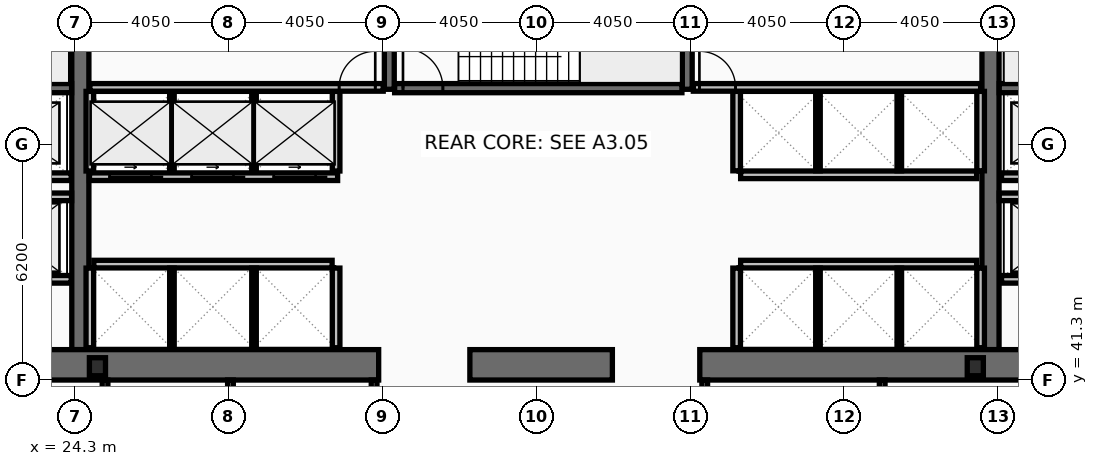
"""IFC4 building model, lengths in metres.
Left out: names, types, materials, properties, quantities, classifications, styles, units other than length and angle.
Written with IfcOpenShell. Run it as: python <this file> out.ifc"""

import sys

from ifc_helpers import new_model, si_unit, direction, frame, frame_2d, origin, origin_2d, place, context, subcontext, project, spatial, rectangle, i_section, extrude, element, fill, save


model = new_model("IFC4")
c1 = context("Model", 3, precision=1e-05, world=origin(), true_north=direction((0.0, 1.0)))
c2 = subcontext(c1, "Body", "Model", "MODEL_VIEW")
j1 = project(units=[si_unit("LENGTHUNIT", "METRE"), si_unit("PLANEANGLEUNIT", "RADIAN")], contexts=[c1])
p1 = place(None, origin())
s1 = spatial("IfcSite", under=j1, at=p1, CompositionType="ELEMENT")
p2 = place(p1, origin())
s2 = spatial("IfcBuilding", under=s1, at=p2, CompositionType="ELEMENT")
p3 = place(p2, frame((0.0, 0.0, 77.8)))
s3 = spatial("IfcBuildingStorey", under=s2, at=p3, CompositionType="ELEMENT", Elevation=77.8)
for number, where, z_axis, x_axis in (
    (1, (24.45, 42.1, 0.0), (0.0, 0.0, 1.0), (0.0, 1.0, 0.0)),
    (2, (48.4, 42.1, 0.0), (0.0, 0.0, 1.0), (0.0, 1.0, 0.0)),
):
    element("IfcWall", number, at=place(p3, frame(where, z_axis=z_axis, x_axis=x_axis)), inside=s3, PredefinedType="SHEAR", context=c2, shape_type="SweptSolid", body=[
        extrude(rectangle(XDim=10.8, YDim=0.45, at=frame_2d((5.4, 0.0))), origin(), (0.0, 0.0, 1.0), 3.82),
    ])
p4 = place(p3, frame((32.3, 41.7, 0.0), z_axis=(0.0, 0.0, 1.0), x_axis=(-1.0, 0.0, 0.0)))
e3 = element("IfcWall", 3, at=p4, inside=s3, PredefinedType="SHEAR", context=c2, shape_type="SweptSolid", body=[
    extrude(rectangle(XDim=11.45, YDim=0.8, at=frame_2d((5.725, 0.0))), origin(), (0.0, 0.0, 1.0), 3.82),
])
p5 = place(p3, frame((38.45, 41.7, 0.0), z_axis=(0.0, 0.0, 1.0), x_axis=(-1.0, 0.0, 0.0)))
e4 = element("IfcWall", 4, at=p5, inside=s3, PredefinedType="SHEAR", context=c2, shape_type="SweptSolid", body=[
    extrude(rectangle(XDim=3.75, YDim=0.8, at=frame_2d((1.875, 0.0))), origin(), (0.0, 0.0, 1.0), 3.82),
])
p6 = place(p3, frame((52.05, 41.7, 0.0), z_axis=(0.0, 0.0, 1.0), x_axis=(-1.0, 0.0, 0.0)))
e5 = element("IfcWall", 5, at=p6, inside=s3, PredefinedType="SHEAR", context=c2, shape_type="SweptSolid", body=[
    extrude(rectangle(XDim=11.3, YDim=0.8, at=frame_2d((5.65, 0.0))), origin(), (0.0, 0.0, 1.0), 3.82),
])
for number, where, z_axis, x_axis in (
    (6, (32.58, 48.95, 0.0), (0.0, 0.0, 1.0), (0.0, 1.0, 0.0)),
    (7, (40.42, 48.95, 0.0), (0.0, 0.0, 1.0), (0.0, 1.0, 0.0)),
):
    element("IfcWall", number, at=place(p3, frame(where, z_axis=z_axis, x_axis=x_axis)), inside=s3, PredefinedType="SHEAR", context=c2, shape_type="SweptSolid", body=[
        extrude(rectangle(XDim=3.95, YDim=0.26, at=frame_2d((1.975, 0.0))), origin(), (0.0, 0.0, 1.0), 3.82),
    ])
p7 = place(p3, frame((17.0, 48.98, 0.0), z_axis=(0.0, 0.0, 1.0), x_axis=(1.0, 0.0, 0.0)))
e8 = element("IfcWall", 8, at=p7, inside=s3, PredefinedType="SHEAR", context=c2, shape_type="SweptSolid", body=[
    extrude(rectangle(XDim=7.22, YDim=0.24, at=frame_2d((3.61, 0.0))), origin(), (0.0, 0.0, 1.0), 3.82),
])
p8 = place(p7, frame((0.22, 0.0, 0.0)))
e9 = element("IfcOpeningElement", 9, at=p8, cuts=e8, PredefinedType="OPENING", context=c2, shape_type="SweptSolid", body=[
    extrude(rectangle(XDim=1.05, YDim=2.15, at=frame_2d((0.525, 1.075))), frame((0.0, 0.13, 0.0), z_axis=(0.0, -1.0, 0.0), x_axis=(1.0, 0.0, 0.0)), (0.0, 0.0, 1.0), 0.26),
])
p9 = place(p3, frame((48.63, 48.98, 0.0), z_axis=(0.0, 0.0, 1.0), x_axis=(1.0, 0.0, 0.0)))
e10 = element("IfcWall", 10, at=p9, inside=s3, PredefinedType="SHEAR", context=c2, shape_type="SweptSolid", body=[
    extrude(rectangle(XDim=7.27, YDim=0.24, at=frame_2d((3.635, 0.0))), origin(), (0.0, 0.0, 1.0), 3.82),
])
p10 = place(p9, frame((6.0, 0.0, 0.0)))
e11 = element("IfcOpeningElement", 11, at=p10, cuts=e10, PredefinedType="OPENING", context=c2, shape_type="SweptSolid", body=[
    extrude(rectangle(XDim=1.05, YDim=2.15, at=frame_2d((0.525, 1.075))), frame((0.0, 0.13, 0.0), z_axis=(0.0, -1.0, 0.0), x_axis=(1.0, 0.0, 0.0)), (0.0, 0.0, 1.0), 0.26),
])
p11 = place(p3, frame((32.72, 48.98, 0.0), z_axis=(0.0, 0.0, 1.0), x_axis=(1.0, 0.0, 0.0)))
e12 = element("IfcWall", 12, at=p11, inside=s3, PredefinedType="SHEAR", context=c2, shape_type="SweptSolid", body=[
    extrude(rectangle(XDim=7.56, YDim=0.24, at=frame_2d((3.78, 0.0))), origin(), (0.0, 0.0, 1.0), 3.82),
])
p12 = place(p11, frame((0.22, 0.0, 0.0)))
e13 = element("IfcOpeningElement", 13, at=p12, cuts=e12, PredefinedType="OPENING", context=c2, shape_type="SweptSolid", body=[
    extrude(rectangle(XDim=1.05, YDim=2.15, at=frame_2d((0.525, 1.075))), frame((0.0, 0.13, 0.0), z_axis=(0.0, -1.0, 0.0), x_axis=(1.0, 0.0, 0.0)), (0.0, 0.0, 1.0), 0.26),
])
for number, where, z_axis, x_axis in (
    (14, (24.9, 41.65, 0.0), (0.0, 0.0, 1.0), (1.0, 0.0, 0.0)),
    (15, (48.0, 41.65, 0.0), (0.0, 0.0, 1.0), (1.0, 0.0, 0.0)),
):
    element("IfcColumn", number, at=place(p3, frame(where, z_axis=z_axis, x_axis=x_axis)), inside=s3, PredefinedType="COLUMN", context=c2, shape_type="SweptSolid", body=[
        extrude(i_section(OverallWidth=0.424, OverallDepth=0.474, WebThickness=0.048, FlangeThickness=0.077, at=origin_2d()), origin(), (0.0, 0.0, 1.0), 4.0),
    ])
p13 = place(p3, frame((51.61, 43.95, 0.0), z_axis=(0.0, 0.0, 1.0), x_axis=(-1.0, 0.0, 0.0)))
e16 = element("IfcWall", 16, at=p13, inside=s3, PredefinedType="PARTITIONING", context=c2, shape_type="SweptSolid", body=[
    extrude(rectangle(XDim=2.92, YDim=0.2, at=frame_2d((1.46, 0.0))), origin(), (0.0, 0.0, 1.0), 3.82),
])
p14 = place(p13, frame((0.81, 0.0, 0.0)))
e17 = element("IfcOpeningElement", 17, at=p14, cuts=e16, PredefinedType="OPENING", context=c2, shape_type="SweptSolid", body=[
    extrude(rectangle(XDim=1.3, YDim=2.18, at=frame_2d((0.65, 1.09))), frame((0.0, 0.11, 0.0), z_axis=(0.0, -1.0, 0.0), x_axis=(1.0, 0.0, 0.0)), (0.0, 0.0, 1.0), 0.22),
])
p15 = place(p3, frame((24.21, 43.95, 0.0), z_axis=(0.0, 0.0, 1.0), x_axis=(-1.0, 0.0, 0.0)))
e18 = element("IfcWall", 18, at=p15, inside=s3, PredefinedType="PARTITIONING", context=c2, shape_type="SweptSolid", body=[
    extrude(rectangle(XDim=2.97, YDim=0.2, at=frame_2d((1.485, 0.0))), origin(), (0.0, 0.0, 1.0), 3.82),
])
p16 = place(p15, frame((0.86, 0.0, 0.0)))
e19 = element("IfcOpeningElement", 19, at=p16, cuts=e18, PredefinedType="OPENING", context=c2, shape_type="SweptSolid", body=[
    extrude(rectangle(XDim=1.3, YDim=2.18, at=frame_2d((0.65, 1.09))), frame((0.0, 0.11, 0.0), z_axis=(0.0, -1.0, 0.0), x_axis=(1.0, 0.0, 0.0)), (0.0, 0.0, 1.0), 0.22),
])
p17 = place(p3, frame((51.61, 46.65, 0.0), z_axis=(0.0, 0.0, 1.0), x_axis=(-1.0, 0.0, 0.0)))
e20 = element("IfcWall", 20, at=p17, inside=s3, PredefinedType="PARTITIONING", context=c2, shape_type="SweptSolid", body=[
    extrude(rectangle(XDim=2.92, YDim=0.2, at=frame_2d((1.46, 0.0))), origin(), (0.0, 0.0, 1.0), 3.82),
])
p18 = place(p17, frame((0.86, 0.0, 0.0)))
e21 = element("IfcOpeningElement", 21, at=p18, cuts=e20, PredefinedType="OPENING", context=c2, shape_type="SweptSolid", body=[
    extrude(rectangle(XDim=1.2, YDim=2.18, at=frame_2d((0.6, 1.09))), frame((0.0, 0.11, 0.0), z_axis=(0.0, -1.0, 0.0), x_axis=(1.0, 0.0, 0.0)), (0.0, 0.0, 1.0), 0.22),
])
p19 = place(p3, frame((24.21, 46.65, 0.0), z_axis=(0.0, 0.0, 1.0), x_axis=(-1.0, 0.0, 0.0)))
e22 = element("IfcWall", 22, at=p19, inside=s3, PredefinedType="PARTITIONING", context=c2, shape_type="SweptSolid", body=[
    extrude(rectangle(XDim=2.97, YDim=0.2, at=frame_2d((1.485, 0.0))), origin(), (0.0, 0.0, 1.0), 3.82),
])
p20 = place(p19, frame((0.91, 0.0, 0.0)))
e23 = element("IfcOpeningElement", 23, at=p20, cuts=e22, PredefinedType="OPENING", context=c2, shape_type="SweptSolid", body=[
    extrude(rectangle(XDim=1.2, YDim=2.18, at=frame_2d((0.6, 1.09))), frame((0.0, 0.11, 0.0), z_axis=(0.0, -1.0, 0.0), x_axis=(1.0, 0.0, 0.0)), (0.0, 0.0, 1.0), 0.22),
])
p21 = place(p3, frame((31.22, 46.65, 0.0), z_axis=(0.0, 0.0, 1.0), x_axis=(-1.0, 0.0, 0.0)))
e24 = element("IfcWall", 24, at=p21, inside=s3, PredefinedType="PARTITIONING", context=c2, shape_type="SweptSolid", body=[
    extrude(rectangle(XDim=6.53, YDim=0.2, at=frame_2d((3.265, 0.0))), origin(), (0.0, 0.0, 1.0), 3.82),
])
p22 = place(p21, frame((4.9, 0.0, 0.0)))
e25 = element("IfcOpeningElement", 25, at=p22, cuts=e24, PredefinedType="OPENING", context=c2, shape_type="SweptSolid", body=[
    extrude(rectangle(XDim=1.1, YDim=2.18, at=frame_2d((0.55, 1.09))), frame((0.0, 0.11, 0.0), z_axis=(0.0, -1.0, 0.0), x_axis=(1.0, 0.0, 0.0)), (0.0, 0.0, 1.0), 0.22),
])
p23 = place(p21, frame((2.74, 0.0, 0.0)))
e26 = element("IfcOpeningElement", 26, at=p23, cuts=e24, PredefinedType="OPENING", context=c2, shape_type="SweptSolid", body=[
    extrude(rectangle(XDim=1.1, YDim=2.18, at=frame_2d((0.55, 1.09))), frame((0.0, 0.11, 0.0), z_axis=(0.0, -1.0, 0.0), x_axis=(1.0, 0.0, 0.0)), (0.0, 0.0, 1.0), 0.22),
])
p24 = place(p21, frame((0.58, 0.0, 0.0)))
e27 = element("IfcOpeningElement", 27, at=p24, cuts=e24, PredefinedType="OPENING", context=c2, shape_type="SweptSolid", body=[
    extrude(rectangle(XDim=1.1, YDim=2.18, at=frame_2d((0.55, 1.09))), frame((0.0, 0.11, 0.0), z_axis=(0.0, -1.0, 0.0), x_axis=(1.0, 0.0, 0.0)), (0.0, 0.0, 1.0), 0.22),
])
p25 = place(p3, frame((21.2, 46.12, 0.0), z_axis=(0.0, 0.0, 1.0), x_axis=(1.0, 0.0, 0.0)))
e28 = element("IfcWall", 28, at=p25, inside=s3, PredefinedType="PARTITIONING", context=c2, shape_type="SweptSolid", body=[
    extrude(rectangle(XDim=3.02, YDim=0.2, at=frame_2d((1.51, 0.0))), origin(), (0.0, 0.0, 1.0), 3.82),
])
p26 = place(p3, frame((48.63, 46.12, 0.0), z_axis=(0.0, 0.0, 1.0), x_axis=(1.0, 0.0, 0.0)))
e29 = element("IfcWall", 29, at=p26, inside=s3, PredefinedType="PARTITIONING", context=c2, shape_type="SweptSolid", body=[
    extrude(rectangle(XDim=3.07, YDim=0.2, at=frame_2d((1.535, 0.0))), origin(), (0.0, 0.0, 1.0), 3.82),
])
for number, where, z_axis, x_axis in (
    (30, (24.7, 46.8, 0.0), (0.0, 0.0, 1.0), (0.0, 1.0, 0.0)),
    (31, (31.18, 46.8, 0.0), (0.0, 0.0, 1.0), (0.0, 1.0, 0.0)),
):
    element("IfcWall", number, at=place(p3, frame(where, z_axis=z_axis, x_axis=x_axis)), inside=s3, PredefinedType="PARTITIONING", context=c2, shape_type="SweptSolid", body=[
        extrude(rectangle(XDim=2.095, YDim=0.2, at=frame_2d((1.047, 0.0))), origin(), (0.0, 0.0, 1.0), 3.82),
    ])
for number, where, z_axis, x_axis in (
    (32, (26.86, 46.8, 0.0), (0.0, 0.0, 1.0), (0.0, 1.0, 0.0)),
    (33, (29.02, 46.8, 0.0), (0.0, 0.0, 1.0), (0.0, 1.0, 0.0)),
):
    element("IfcWall", number, at=place(p3, frame(where, z_axis=z_axis, x_axis=x_axis)), inside=s3, PredefinedType="PARTITIONING", context=c2, shape_type="SweptSolid", body=[
        extrude(rectangle(XDim=2.095, YDim=0.12, at=frame_2d((1.047, 0.0))), origin(), (0.0, 0.0, 1.0), 3.82),
    ])
p27 = place(p3, frame((24.805, 44.35, 0.0), z_axis=(0.0, 0.0, 1.0), x_axis=(1.0, 0.0, 0.0)))
e34 = element("IfcWall", 34, at=p27, inside=s3, PredefinedType="PARTITIONING", context=c2, shape_type="SweptSolid", body=[
    extrude(rectangle(XDim=6.27, YDim=0.2, at=frame_2d((3.135, 0.0))), origin(), (0.0, 0.0, 1.0), 3.82),
])
for number, where, z_axis, x_axis in (
    (35, (24.7, 42.15, 0.0), (0.0, 0.0, 1.0), (0.0, 1.0, 0.0)),
    (36, (31.18, 42.15, 0.0), (0.0, 0.0, 1.0), (0.0, 1.0, 0.0)),
):
    element("IfcWall", number, at=place(p3, frame(where, z_axis=z_axis, x_axis=x_axis)), inside=s3, PredefinedType="PARTITIONING", context=c2, shape_type="SweptSolid", body=[
        extrude(rectangle(XDim=2.095, YDim=0.2, at=frame_2d((1.048, 0.0))), origin(), (0.0, 0.0, 1.0), 3.82),
    ])
for number, where, z_axis, x_axis in (
    (37, (26.86, 42.15, 0.0), (0.0, 0.0, 1.0), (0.0, 1.0, 0.0)),
    (38, (29.02, 42.15, 0.0), (0.0, 0.0, 1.0), (0.0, 1.0, 0.0)),
):
    element("IfcWall", number, at=place(p3, frame(where, z_axis=z_axis, x_axis=x_axis)), inside=s3, PredefinedType="PARTITIONING", context=c2, shape_type="SweptSolid", body=[
        extrude(rectangle(XDim=2.095, YDim=0.12, at=frame_2d((1.048, 0.0))), origin(), (0.0, 0.0, 1.0), 3.82),
    ])
p28 = place(p3, frame((41.825, 46.7, 0.0), z_axis=(0.0, 0.0, 1.0), x_axis=(1.0, 0.0, 0.0)))
e39 = element("IfcWall", 39, at=p28, inside=s3, PredefinedType="PARTITIONING", context=c2, shape_type="SweptSolid", body=[
    extrude(rectangle(XDim=6.21, YDim=0.2, at=frame_2d((3.105, 0.0))), origin(), (0.0, 0.0, 1.0), 3.82),
])
for number, where, z_axis, x_axis in (
    (40, (41.72, 46.805, 0.0), (0.0, 0.0, 1.0), (0.0, 1.0, 0.0)),
    (41, (48.14, 46.805, 0.0), (0.0, 0.0, 1.0), (0.0, 1.0, 0.0)),
):
    element("IfcWall", number, at=place(p3, frame(where, z_axis=z_axis, x_axis=x_axis)), inside=s3, PredefinedType="PARTITIONING", context=c2, shape_type="SweptSolid", body=[
        extrude(rectangle(XDim=2.09, YDim=0.2, at=frame_2d((1.045, 0.0))), origin(), (0.0, 0.0, 1.0), 3.82),
    ])
for number, where, z_axis, x_axis in (
    (42, (43.86, 46.805, 0.0), (0.0, 0.0, 1.0), (0.0, 1.0, 0.0)),
    (43, (46.0, 46.805, 0.0), (0.0, 0.0, 1.0), (0.0, 1.0, 0.0)),
):
    element("IfcWall", number, at=place(p3, frame(where, z_axis=z_axis, x_axis=x_axis)), inside=s3, PredefinedType="PARTITIONING", context=c2, shape_type="SweptSolid", body=[
        extrude(rectangle(XDim=2.09, YDim=0.12, at=frame_2d((1.045, 0.0))), origin(), (0.0, 0.0, 1.0), 3.82),
    ])
p29 = place(p3, frame((41.825, 44.35, 0.0), z_axis=(0.0, 0.0, 1.0), x_axis=(1.0, 0.0, 0.0)))
e44 = element("IfcWall", 44, at=p29, inside=s3, PredefinedType="PARTITIONING", context=c2, shape_type="SweptSolid", body=[
    extrude(rectangle(XDim=6.21, YDim=0.2, at=frame_2d((3.105, 0.0))), origin(), (0.0, 0.0, 1.0), 3.82),
])
for number, where, z_axis, x_axis in (
    (45, (41.72, 42.15, 0.0), (0.0, 0.0, 1.0), (0.0, 1.0, 0.0)),
    (46, (48.14, 42.15, 0.0), (0.0, 0.0, 1.0), (0.0, 1.0, 0.0)),
):
    element("IfcWall", number, at=place(p3, frame(where, z_axis=z_axis, x_axis=x_axis)), inside=s3, PredefinedType="PARTITIONING", context=c2, shape_type="SweptSolid", body=[
        extrude(rectangle(XDim=2.095, YDim=0.2, at=frame_2d((1.048, 0.0))), origin(), (0.0, 0.0, 1.0), 3.82),
    ])
for number, where, z_axis, x_axis in (
    (47, (43.86, 42.15, 0.0), (0.0, 0.0, 1.0), (0.0, 1.0, 0.0)),
    (48, (46.0, 42.15, 0.0), (0.0, 0.0, 1.0), (0.0, 1.0, 0.0)),
):
    element("IfcWall", number, at=place(p3, frame(where, z_axis=z_axis, x_axis=x_axis)), inside=s3, PredefinedType="PARTITIONING", context=c2, shape_type="SweptSolid", body=[
        extrude(rectangle(XDim=2.095, YDim=0.12, at=frame_2d((1.048, 0.0))), origin(), (0.0, 0.0, 1.0), 3.82),
    ])
p30 = place(p3, frame((24.7, 49.0, 0.0), z_axis=(0.0, 0.0, 1.0), x_axis=(1.0, 0.0, 0.0)))
e49 = element("IfcWall", 49, at=p30, inside=s3, PredefinedType="PARTITIONING", context=c2, shape_type="SweptSolid", body=[
    extrude(rectangle(XDim=7.72, YDim=0.2, at=frame_2d((3.86, 0.0))), origin(), (0.0, 0.0, 1.0), 3.82),
])
p31 = place(p30, frame((6.56, 0.0, 0.0)))
e50 = element("IfcOpeningElement", 50, at=p31, cuts=e49, PredefinedType="OPENING", context=c2, shape_type="SweptSolid", body=[
    extrude(rectangle(XDim=0.95, YDim=2.1, at=frame_2d((0.475, 1.05))), frame((0.0, 0.11, 0.0), z_axis=(0.0, -1.0, 0.0), x_axis=(1.0, 0.0, 0.0)), (0.0, 0.0, 1.0), 0.22),
])
p32 = place(p3, frame((40.58, 49.0, 0.0), z_axis=(0.0, 0.0, 1.0), x_axis=(1.0, 0.0, 0.0)))
e51 = element("IfcWall", 51, at=p32, inside=s3, PredefinedType="PARTITIONING", context=c2, shape_type="SweptSolid", body=[
    extrude(rectangle(XDim=7.56, YDim=0.2, at=frame_2d((3.78, 0.0))), origin(), (0.0, 0.0, 1.0), 3.82),
])
p33 = place(p32, frame((0.16, 0.0, 0.0)))
e52 = element("IfcOpeningElement", 52, at=p33, cuts=e51, PredefinedType="OPENING", context=c2, shape_type="SweptSolid", body=[
    extrude(rectangle(XDim=0.95, YDim=2.1, at=frame_2d((0.475, 1.05))), frame((0.0, 0.11, 0.0), z_axis=(0.0, -1.0, 0.0), x_axis=(1.0, 0.0, 0.0)), (0.0, 0.0, 1.0), 0.22),
])
p34 = place(p3, frame((25.1, 38.28, 0.0), z_axis=(0.0, 0.0, 1.0), x_axis=(0.0, 1.0, 0.0)))
e53 = element("IfcWall", 53, at=p34, inside=s3, PredefinedType="PARTITIONING", context=c2, shape_type="SweptSolid", body=[
    extrude(rectangle(XDim=3.02, YDim=0.15, at=frame_2d((1.51, 0.0))), origin(), (0.0, 0.0, 1.0), 3.01),
])
for number, where, z_axis, x_axis in (
    (54, (28.4, 38.28, 0.0), (0.0, 0.0, 1.0), (0.0, 1.0, 0.0)),
    (55, (32.18, 38.28, 0.0), (0.0, 0.0, 1.0), (0.0, 1.0, 0.0)),
    (56, (40.88, 38.28, 0.0), (0.0, 0.0, 1.0), (0.0, 1.0, 0.0)),
    (57, (45.55, 38.28, 0.0), (0.0, 0.0, 1.0), (0.0, 1.0, 0.0)),
):
    element("IfcWall", number, at=place(p3, frame(where, z_axis=z_axis, x_axis=x_axis)), inside=s3, PredefinedType="PARTITIONING", context=c2, shape_type="SweptSolid", body=[
        extrude(rectangle(XDim=3.02, YDim=0.15, at=frame_2d((1.51, 0.0))), origin(), (0.0, 0.0, 1.0), 3.82),
    ])
p35 = place(p12, origin())
e58 = element("IfcDoor", 58, at=p35, inside=s3, OperationType="SINGLE_SWING_LEFT", PredefinedType="DOOR", context=c2, shape_type="SweptSolid", body=[
    extrude(rectangle(XDim=1.05, YDim=2.15, at=frame_2d((0.525, 1.075))), frame((0.0, 0.025, 0.0), z_axis=(0.0, -1.0, 0.0), x_axis=(1.0, 0.0, 0.0)), (0.0, 0.0, 1.0), 0.05),
])
fill(e13, e58)
p36 = place(p22, origin())
e59 = element("IfcDoor", 59, at=p36, inside=s3, OperationType="SLIDING_TO_LEFT", PredefinedType="DOOR", context=c2, shape_type="SweptSolid", body=[
    extrude(rectangle(XDim=1.1, YDim=2.18, at=frame_2d((0.55, 1.09))), frame((0.0, 0.025, 0.0), z_axis=(0.0, -1.0, 0.0), x_axis=(1.0, 0.0, 0.0)), (0.0, 0.0, 1.0), 0.05),
])
fill(e25, e59)
p37 = place(p23, origin())
e60 = element("IfcDoor", 60, at=p37, inside=s3, OperationType="SLIDING_TO_LEFT", PredefinedType="DOOR", context=c2, shape_type="SweptSolid", body=[
    extrude(rectangle(XDim=1.1, YDim=2.18, at=frame_2d((0.55, 1.09))), frame((0.0, 0.025, 0.0), z_axis=(0.0, -1.0, 0.0), x_axis=(1.0, 0.0, 0.0)), (0.0, 0.0, 1.0), 0.05),
])
fill(e26, e60)
p38 = place(p24, origin())
e61 = element("IfcDoor", 61, at=p38, inside=s3, OperationType="SLIDING_TO_LEFT", PredefinedType="DOOR", context=c2, shape_type="SweptSolid", body=[
    extrude(rectangle(XDim=1.1, YDim=2.18, at=frame_2d((0.55, 1.09))), frame((0.0, 0.025, 0.0), z_axis=(0.0, -1.0, 0.0), x_axis=(1.0, 0.0, 0.0)), (0.0, 0.0, 1.0), 0.05),
])
fill(e27, e61)
p39 = place(p31, origin())
e62 = element("IfcDoor", 62, at=p39, inside=s3, OperationType="SINGLE_SWING_RIGHT", PredefinedType="DOOR", context=c2, shape_type="SweptSolid", body=[
    extrude(rectangle(XDim=0.95, YDim=2.1, at=frame_2d((0.475, 1.05))), frame((0.0, 0.025, 0.0), z_axis=(0.0, -1.0, 0.0), x_axis=(1.0, 0.0, 0.0)), (0.0, 0.0, 1.0), 0.05),
])
fill(e50, e62)
p40 = place(p33, origin())
e63 = element("IfcDoor", 63, at=p40, inside=s3, OperationType="SINGLE_SWING_LEFT", PredefinedType="DOOR", context=c2, shape_type="SweptSolid", body=[
    extrude(rectangle(XDim=0.95, YDim=2.1, at=frame_2d((0.475, 1.05))), frame((0.0, 0.025, 0.0), z_axis=(0.0, -1.0, 0.0), x_axis=(1.0, 0.0, 0.0)), (0.0, 0.0, 1.0), 0.05),
])
fill(e52, e63)
save(model, sys.argv[1])
